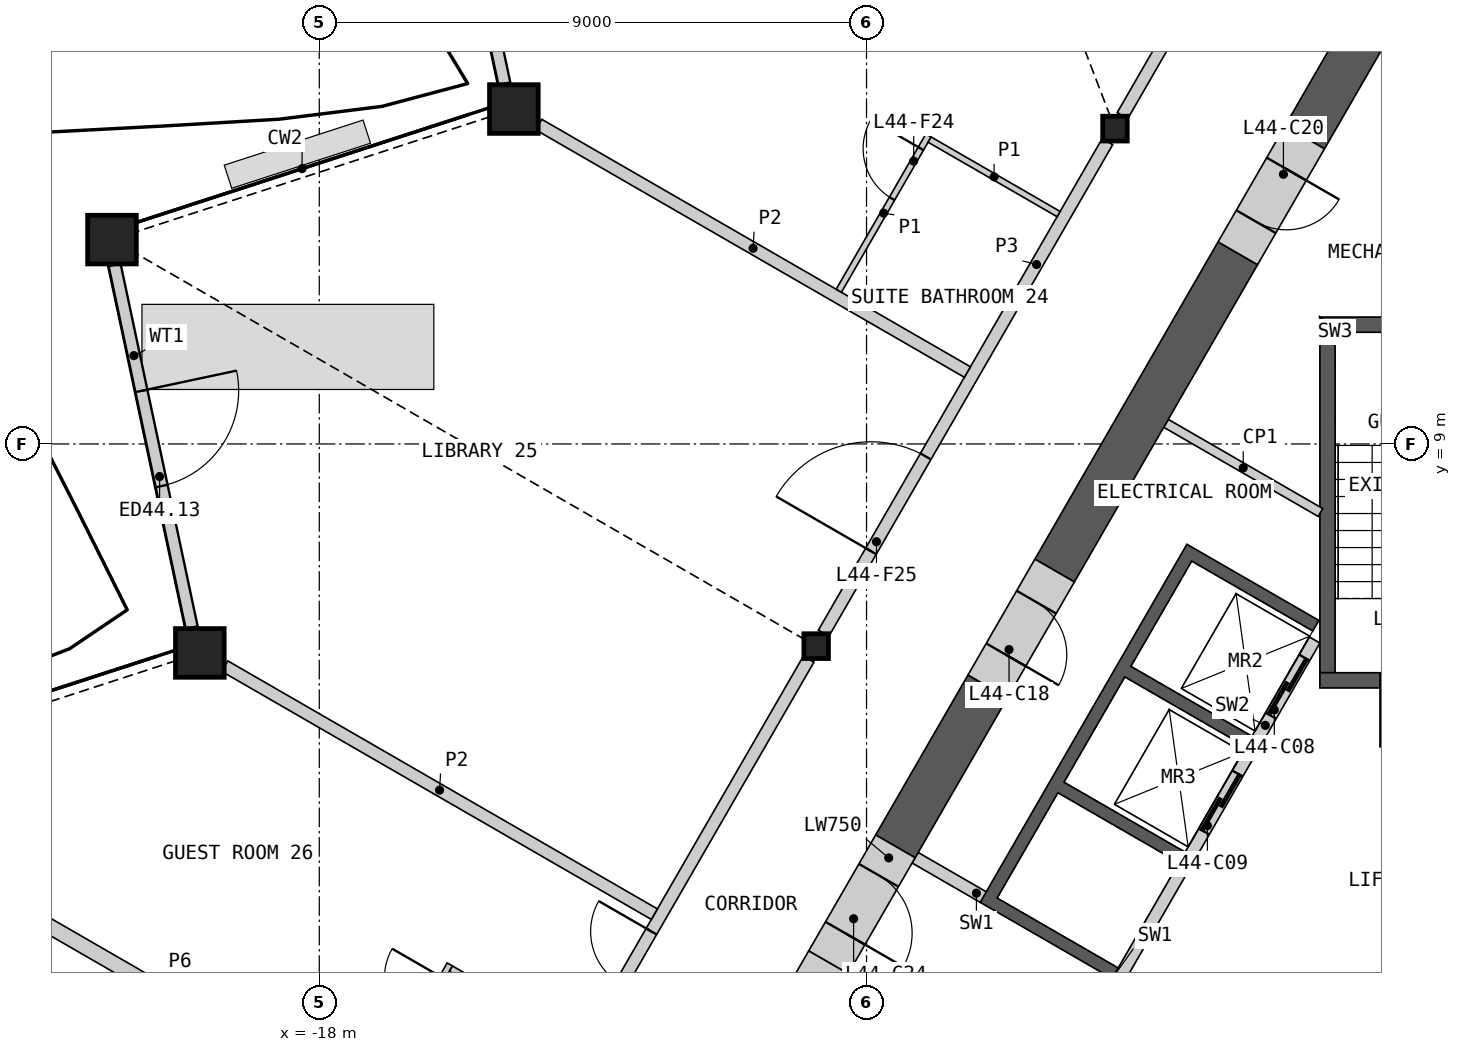
"""IFC4 building model, lengths in metres.
Left out: names, types, materials, properties, quantities, classifications, styles, units other than length and angle.
Written with IfcOpenShell. Run it as: python <this file> out.ifc"""

import sys

from ifc_helpers import new_model, si_unit, direction, frame, frame_2d, origin, origin_2d, place, context, subcontext, project, spatial, polyline, rectangle, hollow_rectangle, i_section, outline, extrude, element, fill, save


model = new_model("IFC4")
c1 = context("Model", 3, precision=1e-05, world=origin(), true_north=direction((0.0, 1.0)))
c2 = subcontext(c1, "Body", "Model", "MODEL_VIEW")
j1 = project(units=[si_unit("LENGTHUNIT", "METRE"), si_unit("PLANEANGLEUNIT", "RADIAN")], contexts=[c1])
p1 = place(None, origin())
s1 = spatial("IfcSite", under=j1, at=p1, CompositionType="ELEMENT")
p2 = place(p1, origin())
s2 = spatial("IfcBuilding", under=s1, at=p2, CompositionType="ELEMENT")
p3 = place(p2, frame((0.0, 0.0, 201.6)))
s3 = spatial("IfcBuildingStorey", under=s2, at=p3, CompositionType="ELEMENT", Elevation=201.6)
for number, where, z_axis, x_axis in (
    (1, (-14.8, 14.508, 0.0), (0.0, 0.0, 1.0), (1.0, 0.0, 0.0)),
    (2, (-21.409, 12.361, 0.0), (0.0, 0.0, 1.0), (1.0, 0.0, 0.0)),
    (3, (-19.965, 5.563, 0.0), (0.0, 0.0, 1.0), (1.0, 0.0, 0.0)),
):
    element("IfcColumn", number, at=place(p3, frame(where, z_axis=z_axis, x_axis=x_axis)), inside=s3, PredefinedType="COLUMN", context=c2, shape_type="SweptSolid", body=[
        extrude(hollow_rectangle(XDim=0.8, YDim=0.8, WallThickness=0.05, at=origin_2d()), origin(), (0.0, 0.0, 1.0), 3.6),
    ])
for number, where, z_axis, x_axis in (
    (4, (-4.914, 14.186, 0.0), (0.0, 0.0, 1.0), (1.0, 0.0, 0.0)),
    (5, (-9.828, 5.675, 0.0), (0.0, 0.0, 1.0), (1.0, 0.0, 0.0)),
):
    element("IfcColumn", number, at=place(p3, frame(where, z_axis=z_axis, x_axis=x_axis)), inside=s3, PredefinedType="COLUMN", context=c2, shape_type="SweptSolid", body=[
        extrude(i_section(OverallWidth=0.404, OverallDepth=0.407, WebThickness=0.027, FlangeThickness=0.044, at=origin_2d()), origin(), (0.0, 0.0, 1.0), 3.6),
    ])
p4 = place(p3, frame((-16.224, 20.89, 0.0), z_axis=(0.0, 0.0, 1.0), x_axis=(0.207912864597, -0.978147351238, 0.0)))
e6 = element("IfcWall", 6, at=p4, inside=s3, PredefinedType="SOLIDWALL", context=c2, shape_type="SweptSolid", body=[
    extrude(rectangle(XDim=6.098, YDim=0.2, at=frame_2d((3.049, 0.0))), origin(), (0.0, 0.0, 1.0), 2.701),
])
p5 = place(p4, frame((2.147, 0.0, 0.0)))
e7 = element("IfcOpeningElement", 7, at=p5, cuts=e6, PredefinedType="OPENING", context=c2, shape_type="SweptSolid", body=[
    extrude(rectangle(XDim=1.6, YDim=2.4, at=frame_2d((0.8, 1.2))), frame((0.0, 0.11, 0.0), z_axis=(0.0, -1.0, 0.0), x_axis=(1.0, 0.0, 0.0)), (0.0, 0.0, 1.0), 0.22),
])
p6 = place(p3, frame((-21.366, 11.944, 0.0), z_axis=(0.0, 0.0, 1.0), x_axis=(0.207912864597, -0.978147351238, 0.0)))
e8 = element("IfcWall", 8, at=p6, inside=s3, PredefinedType="SOLIDWALL", context=c2, shape_type="SweptSolid", body=[
    extrude(rectangle(XDim=6.098, YDim=0.2, at=frame_2d((3.049, 0.0))), origin(), (0.0, 0.0, 1.0), 2.701),
])
p7 = place(p6, frame((2.117, 0.0, 0.0)))
e9 = element("IfcOpeningElement", 9, at=p7, cuts=e8, PredefinedType="OPENING", context=c2, shape_type="SweptSolid", body=[
    extrude(rectangle(XDim=1.6, YDim=2.4, at=frame_2d((0.8, 1.2))), frame((0.0, 0.11, 0.0), z_axis=(0.0, -1.0, 0.0), x_axis=(1.0, 0.0, 0.0)), (0.0, 0.0, 1.0), 0.22),
])
p8 = place(p3, origin())
e10 = element("IfcWall", 10, at=p8, inside=s3, PredefinedType="SHEAR", context=c2, shape_type="SweptSolid", body=[
    extrude(outline(polyline([(-4.96, 0.208), (-7.131, 1.461), (-3.731, 7.35), (-1.561, 6.097), (-1.66, 5.924), (-3.652, 7.074), (-4.652, 5.342), (-2.66, 4.192), (-2.76, 4.019), (-4.752, 5.169), (-5.752, 3.437), (-3.76, 2.287), (-3.861, 2.113), (-5.852, 3.263), (-6.852, 1.531), (-4.861, 0.381), (-4.96, 0.208)])), origin(), (0.0, 0.0, 1.0), 3.25),
])
p9 = place(p3, frame((-1.631, 5.776, 0.0), z_axis=(0.0, 0.0, 1.0), x_axis=(-0.499992876559, -0.866029516466, 0.0)))
e11 = element("IfcWall", 11, at=p9, inside=s3, PredefinedType="SOLIDWALL", context=c2, shape_type="SweptSolid", body=[
    extrude(rectangle(XDim=6.486, YDim=0.2, at=frame_2d((3.243, 0.0))), origin(), (0.0, 0.0, 1.0), 3.25),
])
p10 = place(p9, frame((0.337, 0.0, 0.0)))
e12 = element("IfcOpeningElement", 12, at=p10, cuts=e11, PredefinedType="OPENING", context=c2, shape_type="SweptSolid", body=[
    extrude(rectangle(XDim=1.1, YDim=2.1, at=frame_2d((0.55, 1.05))), frame((0.0, 0.11, 0.0), z_axis=(0.0, -1.0, 0.0), x_axis=(1.0, 0.0, 0.0)), (0.0, 0.0, 1.0), 0.22),
])
p11 = place(p9, frame((2.537, 0.0, 0.0)))
e13 = element("IfcOpeningElement", 13, at=p11, cuts=e11, PredefinedType="OPENING", context=c2, shape_type="SweptSolid", body=[
    extrude(rectangle(XDim=1.1, YDim=2.1, at=frame_2d((0.55, 1.05))), frame((0.0, 0.11, 0.0), z_axis=(0.0, -1.0, 0.0), x_axis=(1.0, 0.0, 0.0)), (0.0, 0.0, 1.0), 0.22),
])
for number, where, z_axis, x_axis in (
    (14, (-7.081, 1.548, 0.0), (0.0, 0.0, 1.0), (-0.866, 0.5, 0.0)),
    (15, (-8.181, -0.357, 0.0), (0.0, 0.0, 1.0), (-0.866, 0.5, 0.0)),
):
    element("IfcWall", number, at=place(p3, frame(where, z_axis=z_axis, x_axis=x_axis)), inside=s3, PredefinedType="SHEAR", context=c2, shape_type="SweptSolid", body=[
        extrude(rectangle(XDim=1.293, YDim=0.2, at=frame_2d((0.646, 0.0))), origin(), (0.0, 0.0, 1.0), 3.25),
    ])
p12 = place(p3, origin())
e16 = element("IfcWall", 16, at=p12, inside=s3, PredefinedType="SHEAR", context=c2, shape_type="SweptSolid", body=[
    extrude(outline(polyline([(1.544, 11.087), (-1.544, 11.087), (-1.294, 10.837), (1.294, 10.837), (1.544, 11.087)])), origin(), (0.0, 0.0, 1.0), 3.25),
])
p13 = place(p3, origin())
e17 = element("IfcWall", 17, at=p13, inside=s3, PredefinedType="SHEAR", context=c2, shape_type="SweptSolid", body=[
    extrude(outline(polyline([(-1.294, 10.837), (-1.544, 11.087), (-1.544, 5.237), (-1.294, 5.237), (-1.294, 10.837)])), origin(), (0.0, 0.0, 1.0), 3.25),
])
p14 = place(p3, frame((1.544, 5.112, 0.0), z_axis=(0.0, 0.0, 1.0), x_axis=(-1.0, 0.0, 0.0)))
e18 = element("IfcWall", 18, at=p14, inside=s3, PredefinedType="SHEAR", context=c2, shape_type="SweptSolid", body=[
    extrude(rectangle(XDim=3.088, YDim=0.25, at=frame_2d((1.544, 0.0))), origin(), (0.0, 0.0, 1.0), 3.25),
])
p15 = place(p14, frame((0.994, 0.0, 0.0)))
e19 = element("IfcOpeningElement", 19, at=p15, cuts=e18, PredefinedType="OPENING", context=c2, shape_type="SweptSolid", body=[
    extrude(rectangle(XDim=1.1, YDim=2.1, at=frame_2d((0.55, 1.05))), frame((0.0, 0.135, 0.0), z_axis=(0.0, -1.0, 0.0), x_axis=(1.0, 0.0, 0.0)), (0.0, 0.0, 1.0), 0.27),
])
p16 = place(p3, frame((-4.075, 9.339, 0.0), z_axis=(0.0, 0.0, 1.0), x_axis=(0.865995658863, -0.500051516177, 0.0)))
e20 = element("IfcWall", 20, at=p16, inside=s3, PredefinedType="PARTITIONING", context=c2, shape_type="SweptSolid", body=[
    extrude(rectangle(XDim=2.933, YDim=0.15, at=frame_2d((1.466, 0.0))), origin(), (0.0, 0.0, 1.0), 3.25),
])
p17 = place(p3, frame((-2.894, 12.136, 0.0), z_axis=(0.0, 0.0, 1.0), x_axis=(-0.500021737671, -0.866012853171, 0.0)))
e21 = element("IfcWall", 21, at=p17, inside=s3, PredefinedType="SHEAR", context=c2, shape_type="SweptSolid", body=[
    extrude(rectangle(XDim=6.026, YDim=0.75, at=frame_2d((3.013, 0.0))), origin(), (0.0, 0.0, 1.0), 3.25),
])
p18 = place(p3, frame((-7.006, 5.012, 0.0), z_axis=(0.0, 0.0, 1.0), x_axis=(-0.49996826437, -0.866043725583, 0.0)))
e22 = element("IfcWall", 22, at=p18, inside=s3, PredefinedType="SHEAR", context=c2, shape_type="SweptSolid", body=[
    extrude(rectangle(XDim=3.038, YDim=0.75, at=frame_2d((1.519, 0.0))), origin(), (0.0, 0.0, 1.0), 3.25),
])
p19 = place(p3, frame((-0.325, 16.585, 0.0), z_axis=(0.0, 0.0, 1.0), x_axis=(-0.500026977578, -0.866009827712, 0.0)))
e23 = element("IfcWall", 23, at=p19, inside=s3, PredefinedType="SHEAR", context=c2, shape_type="SweptSolid", body=[
    extrude(rectangle(XDim=2.938, YDim=0.75, at=frame_2d((1.469, 0.0))), origin(), (0.0, 0.0, 1.0), 3.25),
])
p20 = place(p3, frame((-5.906, 6.918, 0.0), z_axis=(0.0, 0.0, 1.0), x_axis=(-0.499946605688, -0.86605622881, 0.0)))
e24 = element("IfcWall", 24, at=p20, inside=s3, PredefinedType="SHEAR", context=c2, shape_type="SweptSolid", body=[
    extrude(rectangle(XDim=2.2, YDim=0.75, at=frame_2d((1.1, 0.0))), origin(), (0.0, 0.0, 1.0), 3.25),
])
p21 = place(p20, frame((0.6, 0.0, 0.0)))
e25 = element("IfcOpeningElement", 25, at=p21, cuts=e24, PredefinedType="OPENING", context=c2, shape_type="SweptSolid", body=[
    extrude(rectangle(XDim=1.0, YDim=2.1, at=frame_2d((0.5, 1.05))), frame((0.0, 0.385, 0.0), z_axis=(0.0, -1.0, 0.0), x_axis=(1.0, 0.0, 0.0)), (0.0, 0.0, 1.0), 0.77),
])
p22 = place(p3, frame((-1.794, 14.041, 0.0), z_axis=(0.0, 0.0, 1.0), x_axis=(-0.499946605688, -0.86605622881, 0.0)))
e26 = element("IfcWall", 26, at=p22, inside=s3, PredefinedType="SHEAR", context=c2, shape_type="SweptSolid", body=[
    extrude(rectangle(XDim=2.2, YDim=0.75, at=frame_2d((1.1, 0.0))), origin(), (0.0, 0.0, 1.0), 3.25),
])
p23 = place(p22, frame((0.6, 0.0, 0.0)))
e27 = element("IfcOpeningElement", 27, at=p23, cuts=e26, PredefinedType="OPENING", context=c2, shape_type="SweptSolid", body=[
    extrude(rectangle(XDim=1.0, YDim=2.1, at=frame_2d((0.5, 1.05))), frame((0.0, 0.385, 0.0), z_axis=(0.0, -1.0, 0.0), x_axis=(1.0, 0.0, 0.0)), (0.0, 0.0, 1.0), 0.77),
])
p24 = place(p3, frame((-9.625, 0.477, 0.0), z_axis=(0.0, 0.0, 1.0), x_axis=(-0.500005104963, -0.866022456413, 0.0)))
e28 = element("IfcWall", 28, at=p24, inside=s3, PredefinedType="SHEAR", context=c2, shape_type="SweptSolid", body=[
    extrude(rectangle(XDim=2.941, YDim=0.75, at=frame_2d((1.47, 0.0))), origin(), (0.0, 0.0, 1.0), 3.25),
])
p25 = place(p24, frame((1.35, 0.0, 0.0)))
e29 = element("IfcOpeningElement", 29, at=p25, cuts=e28, PredefinedType="OPENING", context=c2, shape_type="SweptSolid", body=[
    extrude(rectangle(XDim=1.0, YDim=2.1, at=frame_2d((0.5, 1.05))), frame((0.0, 0.385, 0.0), z_axis=(0.0, -1.0, 0.0), x_axis=(1.0, 0.0, 0.0)), (0.0, 0.0, 1.0), 0.77),
])
p26 = place(p3, frame((-8.525, 2.382, 0.0), z_axis=(0.0, 0.0, 1.0), x_axis=(-0.500077893725, -0.86598042715, 0.0)))
e30 = element("IfcWall", 30, at=p26, inside=s3, PredefinedType="SHEAR", context=c2, shape_type="SweptSolid", body=[
    extrude(rectangle(XDim=2.2, YDim=0.75, at=frame_2d((1.1, 0.0))), origin(), (0.0, 0.0, 1.0), 3.25),
])
p27 = place(p26, frame((0.55, 0.0, 0.0)))
e31 = element("IfcOpeningElement", 31, at=p27, cuts=e30, PredefinedType="OPENING", context=c2, shape_type="SweptSolid", body=[
    extrude(rectangle(XDim=1.1, YDim=2.1, at=frame_2d((0.55, 1.05))), frame((0.0, 0.385, 0.0), z_axis=(0.0, -1.0, 0.0), x_axis=(1.0, 0.0, 0.0)), (0.0, 0.0, 1.0), 0.77),
])
p28 = place(p3, frame((-26.164, 3.217, 0.0), z_axis=(0.0, 0.0, 1.0), x_axis=(0.866026026416, -0.499998921569, 0.0)))
e32 = element("IfcWall", 32, at=p28, inside=s3, PredefinedType="PARTITIONING", context=c2, shape_type="SweptSolid", body=[
    extrude(rectangle(XDim=12.918, YDim=0.25, at=frame_2d((6.459, 0.0))), origin(), (0.0, 0.0, 1.0), 2.404),
])
p29 = place(p3, frame((-9.705, 5.888, 0.0), z_axis=(0.0, 0.0, 1.0), x_axis=(0.50000393355, 0.866023132736, 0.0)))
e33 = element("IfcWall", 33, at=p29, inside=s3, PredefinedType="PARTITIONING", context=c2, shape_type="SweptSolid", body=[
    extrude(rectangle(XDim=9.335, YDim=0.2, at=frame_2d((4.667, 0.0))), origin(), (0.0, 0.0, 1.0), 3.25),
])
p30 = place(p29, frame((1.556, 0.0, 0.0)))
e34 = element("IfcOpeningElement", 34, at=p30, cuts=e33, PredefinedType="OPENING", context=c2, shape_type="SweptSolid", body=[
    extrude(rectangle(XDim=1.8, YDim=2.1, at=frame_2d((0.9, 1.05))), frame((0.0, 0.11, 0.0), z_axis=(0.0, -1.0, 0.0), x_axis=(1.0, 0.0, 0.0)), (0.0, 0.0, 1.0), 0.22),
])
p31 = place(p3, frame((-14.619, -2.624, 0.0), z_axis=(0.0, 0.0, 1.0), x_axis=(0.50000393355, 0.866023132736, 0.0)))
e35 = element("IfcWall", 35, at=p31, inside=s3, PredefinedType="PARTITIONING", context=c2, shape_type="SweptSolid", body=[
    extrude(rectangle(XDim=9.335, YDim=0.2, at=frame_2d((4.667, 0.0))), origin(), (0.0, 0.0, 1.0), 3.25),
])
p32 = place(p31, frame((3.163, 0.0, 0.0)))
e36 = element("IfcOpeningElement", 36, at=p32, cuts=e35, PredefinedType="OPENING", context=c2, shape_type="SweptSolid", body=[
    extrude(rectangle(XDim=1.0, YDim=2.1, at=frame_2d((0.5, 1.05))), frame((0.0, 0.11, 0.0), z_axis=(0.0, -1.0, 0.0), x_axis=(1.0, 0.0, 0.0)), (0.0, 0.0, 1.0), 0.22),
])
p33 = place(p3, frame((-4.791, 14.4, 0.0), z_axis=(0.0, 0.0, 1.0), x_axis=(0.50000762079, 0.866021003874, 0.0)))
e37 = element("IfcWall", 37, at=p33, inside=s3, PredefinedType="PARTITIONING", context=c2, shape_type="SweptSolid", body=[
    extrude(rectangle(XDim=5.756, YDim=0.2, at=frame_2d((2.878, 0.0))), origin(), (0.0, 0.0, 1.0), 3.25),
])
p34 = place(p33, frame((4.304, 0.0, 0.0)))
e38 = element("IfcOpeningElement", 38, at=p34, cuts=e37, PredefinedType="OPENING", context=c2, shape_type="SweptSolid", body=[
    extrude(rectangle(XDim=1.1, YDim=2.1, at=frame_2d((0.55, 1.05))), frame((0.0, 0.11, 0.0), z_axis=(0.0, -1.0, 0.0), x_axis=(1.0, 0.0, 0.0)), (0.0, 0.0, 1.0), 0.22),
])
p35 = place(p3, frame((-19.555, 5.345, 0.0), z_axis=(0.0, 0.0, 1.0), x_axis=(0.866026623601, -0.49999788721, 0.0)))
e39 = element("IfcWall", 39, at=p35, inside=s3, PredefinedType="PARTITIONING", context=c2, shape_type="SweptSolid", body=[
    extrude(rectangle(XDim=8.159, YDim=0.2, at=frame_2d((4.079, 0.0))), origin(), (0.0, 0.0, 1.0), 2.404),
])
p36 = place(p3, frame((-14.39, 14.252, 0.0), z_axis=(0.0, 0.0, 1.0), x_axis=(0.866028741424, -0.499994218994, 0.0)))
e40 = element("IfcWall", 40, at=p36, inside=s3, PredefinedType="PARTITIONING", context=c2, shape_type="SweptSolid", body=[
    extrude(rectangle(XDim=8.139, YDim=0.2, at=frame_2d((4.07, 0.0))), origin(), (0.0, 0.0, 1.0), 2.404),
])
p37 = place(p3, frame((-18.453, -4.064, 0.0), z_axis=(0.0, 0.0, 1.0), x_axis=(0.499971721724, 0.866041729639, 0.0)))
e41 = element("IfcWall", 41, at=p37, inside=s3, PredefinedType="PARTITIONING", context=c2, shape_type="SweptSolid", body=[
    extrude(rectangle(XDim=5.2, YDim=0.1, at=frame_2d((2.6, 0.0))), origin(), (0.0, 0.0, 1.0), 2.404),
])
p38 = place(p37, frame((4.0, 0.0, 0.0)))
e42 = element("IfcOpeningElement", 42, at=p38, cuts=e41, PredefinedType="OPENING", context=c2, shape_type="SweptSolid", body=[
    extrude(rectangle(XDim=0.95, YDim=2.1, at=frame_2d((0.475, 1.05))), frame((0.0, 0.06, 0.0), z_axis=(0.0, -1.0, 0.0), x_axis=(1.0, 0.0, 0.0)), (0.0, 0.0, 1.0), 0.12),
])
p39 = place(p37, frame((0.25, 0.0, 0.0)))
e43 = element("IfcOpeningElement", 43, at=p39, cuts=e41, PredefinedType="OPENING", context=c2, shape_type="SweptSolid", body=[
    extrude(rectangle(XDim=0.95, YDim=2.1, at=frame_2d((0.475, 1.05))), frame((0.0, 0.06, 0.0), z_axis=(0.0, -1.0, 0.0), x_axis=(1.0, 0.0, 0.0)), (0.0, 0.0, 1.0), 0.12),
])
p40 = place(p3, frame((-9.456, 11.519, 0.0), z_axis=(0.0, 0.0, 1.0), x_axis=(0.499939757307, 0.866060182126, 0.0)))
e44 = element("IfcWall", 44, at=p40, inside=s3, PredefinedType="PARTITIONING", context=c2, shape_type="SweptSolid", body=[
    extrude(rectangle(XDim=2.95, YDim=0.1, at=frame_2d((1.475, 0.0))), origin(), (0.0, 0.0, 1.0), 2.404),
])
p41 = place(p40, frame((1.75, 0.0, 0.0)))
e45 = element("IfcOpeningElement", 45, at=p41, cuts=e44, PredefinedType="OPENING", context=c2, shape_type="SweptSolid", body=[
    extrude(rectangle(XDim=0.95, YDim=2.1, at=frame_2d((0.475, 1.05))), frame((0.0, 0.06, 0.0), z_axis=(0.0, -1.0, 0.0), x_axis=(1.0, 0.0, 0.0)), (0.0, 0.0, 1.0), 0.12),
])
p42 = place(p3, frame((-7.963, 14.006, 0.0), z_axis=(0.0, 0.0, 1.0), x_axis=(0.866057815567, -0.499943856944, 0.0)))
e46 = element("IfcWall", 46, at=p42, inside=s3, PredefinedType="PARTITIONING", context=c2, shape_type="SweptSolid", body=[
    extrude(rectangle(XDim=2.45, YDim=0.1, at=frame_2d((1.225, 0.0))), origin(), (0.0, 0.0, 1.0), 2.404),
])
p43 = place(p3, frame((-15.835, 0.371, 0.0), z_axis=(0.0, 0.0, 1.0), x_axis=(0.866014668023, -0.500018594424, 0.0)))
e47 = element("IfcWall", 47, at=p43, inside=s3, PredefinedType="PARTITIONING", context=c2, shape_type="SweptSolid", body=[
    extrude(rectangle(XDim=2.45, YDim=0.1, at=frame_2d((1.225, 0.0))), origin(), (0.0, 0.0, 1.0), 2.404),
])
p44 = place(p7, origin())
e48 = element("IfcDoor", 48, at=p44, inside=s3, OperationType="DOUBLE_DOOR_SINGLE_SWING", PredefinedType="DOOR", context=c2, shape_type="SweptSolid", body=[
    extrude(rectangle(XDim=1.6, YDim=2.4, at=frame_2d((0.8, 1.2))), frame((0.0, 0.025, 0.0), z_axis=(0.0, -1.0, 0.0), x_axis=(1.0, 0.0, 0.0)), (0.0, 0.0, 1.0), 0.05),
])
fill(e9, e48)
p45 = place(p10, origin())
e49 = element("IfcDoor", 49, at=p45, inside=s3, OperationType="SLIDING_TO_LEFT", PredefinedType="DOOR", context=c2, shape_type="SweptSolid", body=[
    extrude(rectangle(XDim=1.1, YDim=2.1, at=frame_2d((0.55, 1.05))), frame((0.0, 0.025, 0.0), z_axis=(0.0, -1.0, 0.0), x_axis=(1.0, 0.0, 0.0)), (0.0, 0.0, 1.0), 0.05),
])
fill(e12, e49)
p46 = place(p11, origin())
e50 = element("IfcDoor", 50, at=p46, inside=s3, OperationType="SLIDING_TO_LEFT", PredefinedType="DOOR", context=c2, shape_type="SweptSolid", body=[
    extrude(rectangle(XDim=1.1, YDim=2.1, at=frame_2d((0.55, 1.05))), frame((0.0, 0.025, 0.0), z_axis=(0.0, -1.0, 0.0), x_axis=(1.0, 0.0, 0.0)), (0.0, 0.0, 1.0), 0.05),
])
fill(e13, e50)
p47 = place(p15, origin())
e51 = element("IfcDoor", 51, at=p47, inside=s3, OperationType="SINGLE_SWING_RIGHT", PredefinedType="DOOR", context=c2, shape_type="SweptSolid", body=[
    extrude(rectangle(XDim=1.1, YDim=2.1, at=frame_2d((0.55, 1.05))), frame((0.0, 0.025, 0.0), z_axis=(0.0, -1.0, 0.0), x_axis=(1.0, 0.0, 0.0)), (0.0, 0.0, 1.0), 0.05),
])
fill(e19, e51)
p48 = place(p21, origin())
e52 = element("IfcDoor", 52, at=p48, inside=s3, OperationType="SINGLE_SWING_RIGHT", PredefinedType="DOOR", context=c2, shape_type="SweptSolid", body=[
    extrude(rectangle(XDim=1.0, YDim=2.1, at=frame_2d((0.5, 1.05))), frame((0.0, 0.13, 0.0), z_axis=(0.0, -1.0, 0.0), x_axis=(1.0, 0.0, 0.0)), (0.0, 0.0, 1.0), 0.05),
])
fill(e25, e52)
p49 = place(p23, origin())
e53 = element("IfcDoor", 53, at=p49, inside=s3, OperationType="SINGLE_SWING_LEFT", PredefinedType="DOOR", context=c2, shape_type="SweptSolid", body=[
    extrude(rectangle(XDim=1.0, YDim=2.1, at=frame_2d((0.5, 1.05))), frame((0.0, 0.13, 0.0), z_axis=(0.0, -1.0, 0.0), x_axis=(1.0, 0.0, 0.0)), (0.0, 0.0, 1.0), 0.05),
])
fill(e27, e53)
p50 = place(p27, origin())
e54 = element("IfcDoor", 54, at=p50, inside=s3, OperationType="SINGLE_SWING_RIGHT", PredefinedType="DOOR", context=c2, shape_type="SweptSolid", body=[
    extrude(rectangle(XDim=1.1, YDim=2.1, at=frame_2d((0.55, 1.05))), frame((0.0, 0.13, 0.0), z_axis=(0.0, -1.0, 0.0), x_axis=(1.0, 0.0, 0.0)), (0.0, 0.0, 1.0), 0.05),
])
fill(e31, e54)
p51 = place(p41, origin())
e55 = element("IfcDoor", 55, at=p51, inside=s3, OperationType="SINGLE_SWING_RIGHT", PredefinedType="DOOR", context=c2, shape_type="SweptSolid", body=[
    extrude(rectangle(XDim=0.95, YDim=2.1, at=frame_2d((0.475, 1.05))), frame((0.0, 0.025, 0.0), z_axis=(0.0, -1.0, 0.0), x_axis=(1.0, 0.0, 0.0)), (0.0, 0.0, 1.0), 0.05),
])
fill(e45, e55)
p52 = place(p30, origin())
e56 = element("IfcDoor", 56, at=p52, inside=s3, OperationType="DOUBLE_DOOR_SINGLE_SWING", PredefinedType="DOOR", context=c2, shape_type="SweptSolid", body=[
    extrude(rectangle(XDim=1.8, YDim=2.1, at=frame_2d((0.9, 1.05))), frame((0.0, 0.025, 0.0), z_axis=(0.0, -1.0, 0.0), x_axis=(1.0, 0.0, 0.0)), (0.0, 0.0, 1.0), 0.05),
])
fill(e34, e56)
p53 = place(p32, origin())
e57 = element("IfcDoor", 57, at=p53, inside=s3, OperationType="SINGLE_SWING_RIGHT", PredefinedType="DOOR", context=c2, shape_type="SweptSolid", body=[
    extrude(rectangle(XDim=1.0, YDim=2.1, at=frame_2d((0.5, 1.05))), frame((0.0, 0.025, 0.0), z_axis=(0.0, -1.0, 0.0), x_axis=(1.0, 0.0, 0.0)), (0.0, 0.0, 1.0), 0.05),
])
fill(e36, e57)
save(model, sys.argv[1])
